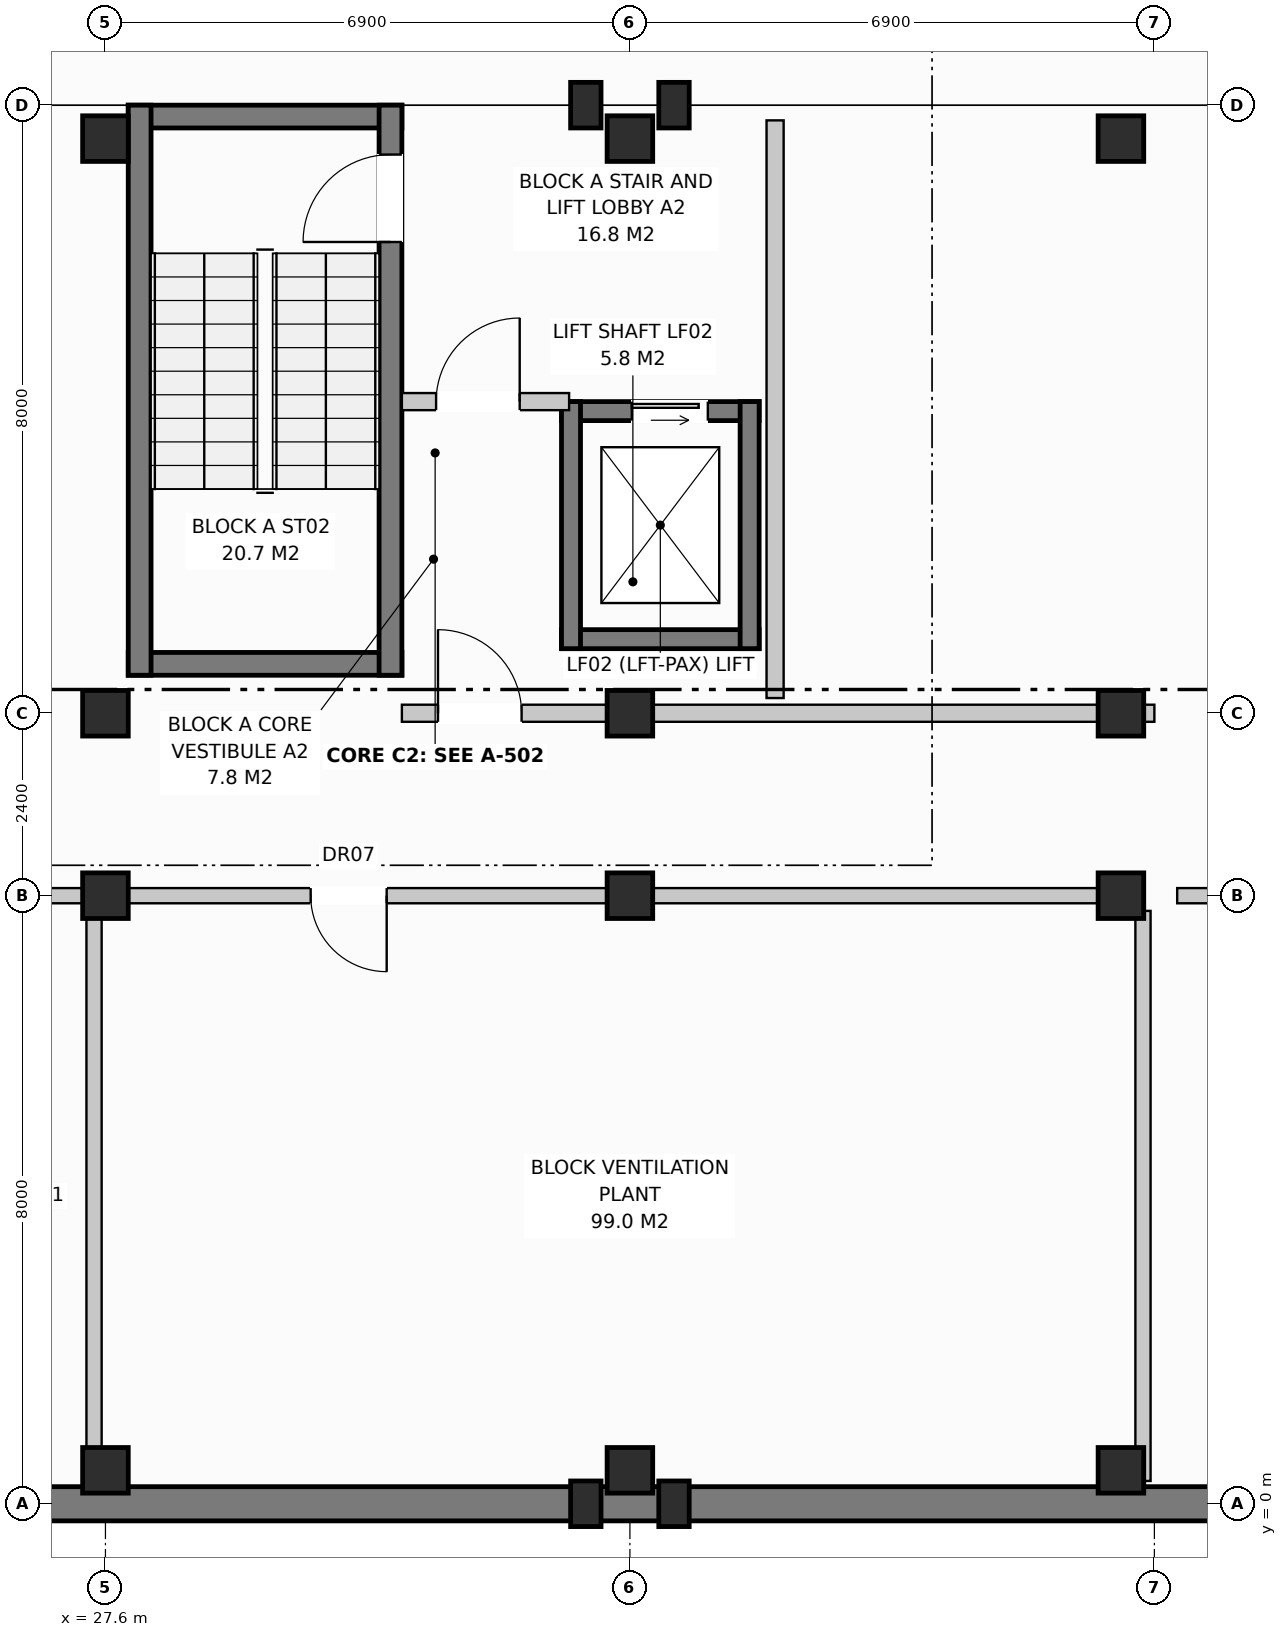
"""IFC4 building model, lengths in metres.
Left out: names, types, materials, properties, quantities, classifications, styles, units other than length and angle.
Written with IfcOpenShell. Run it as: python <this file> out.ifc"""

import sys

from ifc_helpers import new_model, si_unit, direction, frame, frame_2d, origin, origin_with_axes, origin_2d, place, context, subcontext, project, spatial, rectangle, extrude, element, fill, save


model = new_model("IFC4")
c1 = context("Model", 3, precision=1e-05, world=origin(), true_north=direction((0.0, 1.0)))
c2 = subcontext(c1, "Body", "Model", "MODEL_VIEW")
j1 = project(units=[si_unit("LENGTHUNIT", "METRE"), si_unit("PLANEANGLEUNIT", "RADIAN")], contexts=[c1])
p1 = place(None, origin())
s1 = spatial("IfcSite", under=j1, at=p1, CompositionType="ELEMENT")
p2 = place(p1, origin())
s2 = spatial("IfcBuilding", under=s1, at=p2, CompositionType="ELEMENT")
p3 = place(p2, frame((0.0, 0.0, -3.8)))
s3 = spatial("IfcBuildingStorey", under=s2, at=p3, CompositionType="ELEMENT", Elevation=-3.8)
for number, where, z_axis, x_axis in (
    (1, (27.6, 0.44, 0.0), (0.0, 0.0, 1.0), (1.0, 0.0, 0.0)),
    (2, (27.6, 8.0, 0.0), (0.0, 0.0, 1.0), (1.0, 0.0, 0.0)),
    (3, (27.6, 10.4, 0.0), (0.0, 0.0, 1.0), (1.0, 0.0, 0.0)),
    (4, (27.6, 17.96, 0.0), (0.0, 0.0, 1.0), (1.0, 0.0, 0.0)),
    (5, (34.5, 0.44, 0.0), (0.0, 0.0, 1.0), (1.0, 0.0, 0.0)),
    (6, (34.5, 8.0, 0.0), (0.0, 0.0, 1.0), (1.0, 0.0, 0.0)),
    (7, (34.5, 10.4, 0.0), (0.0, 0.0, 1.0), (1.0, 0.0, 0.0)),
    (8, (34.5, 17.96, 0.0), (0.0, 0.0, 1.0), (1.0, 0.0, 0.0)),
    (9, (40.96, 0.44, 0.0), (0.0, 0.0, 1.0), (1.0, 0.0, 0.0)),
    (10, (40.96, 8.0, 0.0), (0.0, 0.0, 1.0), (1.0, 0.0, 0.0)),
    (11, (40.96, 10.4, 0.0), (0.0, 0.0, 1.0), (1.0, 0.0, 0.0)),
    (12, (40.96, 17.96, 0.0), (0.0, 0.0, 1.0), (1.0, 0.0, 0.0)),
):
    element("IfcColumn", number, at=place(p3, frame(where, z_axis=z_axis, x_axis=x_axis)), inside=s3, PredefinedType="COLUMN", context=c2, shape_type="SweptSolid", body=[
        extrude(rectangle(XDim=0.6, YDim=0.6, at=origin_2d()), origin(), (0.0, 0.0, 1.0), 3.8),
    ])
for number, where, z_axis, x_axis in (
    (13, (33.92, 0.0, 0.0), (0.0, 0.0, 1.0), (1.0, 0.0, 0.0)),
    (14, (33.92, 18.4, 0.0), (0.0, 0.0, 1.0), (1.0, 0.0, 0.0)),
    (15, (35.08, 0.0, 0.0), (0.0, 0.0, 1.0), (1.0, 0.0, 0.0)),
    (16, (35.08, 18.4, 0.0), (0.0, 0.0, 1.0), (1.0, 0.0, 0.0)),
):
    element("IfcColumn", number, at=place(p3, frame(where, z_axis=z_axis, x_axis=x_axis)), inside=s3, PredefinedType="PILASTER", context=c2, shape_type="SweptSolid", body=[
        extrude(rectangle(XDim=0.4, YDim=0.6, at=origin_2d()), origin(), (0.0, 0.0, 1.0), 3.8),
    ])
p4 = place(p3, origin_with_axes())
e17 = element("IfcWall", 17, at=p4, inside=s3, PredefinedType="STANDARD", context=c2, shape_type="SweptSolid", body=[
    extrude(rectangle(XDim=168.0, YDim=0.45, at=frame_2d((84.0, 0.0))), origin(), (0.0, 0.0, 1.0), 3.48),
])
for number, where, z_axis, x_axis in (
    (18, (27.9, 18.25, 0.0), (0.0, 0.0, 1.0), (1.0, 0.0, 0.0)),
    (19, (27.9, 11.05, 0.0), (0.0, 0.0, 1.0), (1.0, 0.0, 0.0)),
):
    element("IfcWall", number, at=place(p3, frame(where, z_axis=z_axis, x_axis=x_axis)), inside=s3, PredefinedType="SHEAR", context=c2, shape_type="SweptSolid", body=[
        extrude(rectangle(XDim=3.6, YDim=0.3, at=frame_2d((1.8, 0.0))), origin(), (0.0, 0.0, 1.0), 3.48),
    ])
p5 = place(p3, frame((28.05, 10.9, 0.0), z_axis=(0.0, 0.0, 1.0), x_axis=(0.0, 1.0, 0.0)))
e20 = element("IfcWall", 20, at=p5, inside=s3, PredefinedType="SHEAR", context=c2, shape_type="SweptSolid", body=[
    extrude(rectangle(XDim=7.5, YDim=0.3, at=frame_2d((3.75, 0.0))), origin(), (0.0, 0.0, 1.0), 3.48),
])
p6 = place(p3, frame((31.35, 10.9, 0.0), z_axis=(0.0, 0.0, 1.0), x_axis=(0.0, 1.0, 0.0)))
e21 = element("IfcWall", 21, at=p6, inside=s3, PredefinedType="SHEAR", context=c2, shape_type="SweptSolid", body=[
    extrude(rectangle(XDim=7.5, YDim=0.3, at=frame_2d((3.75, 0.0))), origin(), (0.0, 0.0, 1.0), 3.48),
])
p7 = place(p6, frame((5.7, 0.0, 0.0)))
e22 = element("IfcOpeningElement", 22, at=p7, cuts=e21, PredefinedType="OPENING", context=c2, shape_type="SweptSolid", body=[
    extrude(rectangle(XDim=1.15, YDim=2.15, at=frame_2d((0.575, 1.075))), frame((0.0, 0.162, 0.0), z_axis=(0.0, -1.0, 0.0), x_axis=(1.0, 0.0, 0.0)), (0.0, 0.0, 1.0), 0.324),
])
p8 = place(p3, frame((33.6, 14.375, 0.0), z_axis=(0.0, 0.0, 1.0), x_axis=(1.0, 0.0, 0.0)))
e23 = element("IfcWall", 23, at=p8, inside=s3, PredefinedType="SHEAR", context=c2, shape_type="SweptSolid", body=[
    extrude(rectangle(XDim=2.6, YDim=0.25, at=frame_2d((1.3, 0.0))), origin(), (0.0, 0.0, 1.0), 3.48),
])
p9 = place(p8, frame((0.925, 0.0, 0.0)))
e24 = element("IfcOpeningElement", 24, at=p9, cuts=e23, PredefinedType="OPENING", context=c2, shape_type="SweptSolid", body=[
    extrude(rectangle(XDim=1.0, YDim=2.1, at=frame_2d((0.5, 1.05))), frame((0.0, 0.137, 0.0), z_axis=(0.0, -1.0, 0.0), x_axis=(1.0, 0.0, 0.0)), (0.0, 0.0, 1.0), 0.274),
])
p10 = place(p3, frame((33.6, 11.375, 0.0), z_axis=(0.0, 0.0, 1.0), x_axis=(1.0, 0.0, 0.0)))
e25 = element("IfcWall", 25, at=p10, inside=s3, PredefinedType="SHEAR", context=c2, shape_type="SweptSolid", body=[
    extrude(rectangle(XDim=2.6, YDim=0.25, at=frame_2d((1.3, 0.0))), origin(), (0.0, 0.0, 1.0), 3.48),
])
for number, where, z_axis, x_axis in (
    (26, (33.725, 11.25, 0.0), (0.0, 0.0, 1.0), (0.0, 1.0, 0.0)),
    (27, (36.075, 11.25, 0.0), (0.0, 0.0, 1.0), (0.0, 1.0, 0.0)),
):
    element("IfcWall", number, at=place(p3, frame(where, z_axis=z_axis, x_axis=x_axis)), inside=s3, PredefinedType="SHEAR", context=c2, shape_type="SweptSolid", body=[
        extrude(rectangle(XDim=3.25, YDim=0.25, at=frame_2d((1.625, 0.0))), origin(), (0.0, 0.0, 1.0), 3.48),
    ])
p11 = place(p3, frame((36.41, 10.6, 0.0), z_axis=(0.0, 0.0, 1.0), x_axis=(0.0, 1.0, 0.0)))
e28 = element("IfcWall", 28, at=p11, inside=s3, PredefinedType="PARTITIONING", context=c2, shape_type="SweptSolid", body=[
    extrude(rectangle(XDim=7.6, YDim=0.225, at=frame_2d((3.8, 0.0))), origin(), (0.0, 0.0, 1.0), 3.19),
])
p12 = place(p3, frame((31.5, 14.5, 0.0), z_axis=(0.0, 0.0, 1.0), x_axis=(1.0, 0.0, 0.0)))
e29 = element("IfcWall", 29, at=p12, inside=s3, PredefinedType="PARTITIONING", context=c2, shape_type="SweptSolid", body=[
    extrude(rectangle(XDim=2.2, YDim=0.225, at=frame_2d((1.1, 0.0))), origin(), (0.0, 0.0, 1.0), 3.48),
])
p13 = place(p12, frame((0.45, 0.0, 0.0)))
e30 = element("IfcOpeningElement", 30, at=p13, cuts=e29, PredefinedType="OPENING", context=c2, shape_type="SweptSolid", body=[
    extrude(rectangle(XDim=1.1, YDim=2.15, at=frame_2d((0.55, 1.075))), frame((0.0, 0.125, 0.0), z_axis=(0.0, -1.0, 0.0), x_axis=(1.0, 0.0, 0.0)), (0.0, 0.0, 1.0), 0.249),
])
p14 = place(p3, frame((27.6, 10.4, 0.0), z_axis=(0.0, 0.0, 1.0), x_axis=(1.0, 0.0, 0.0)))
e31 = element("IfcWall", 31, at=p14, inside=s3, PredefinedType="PARTITIONING", context=c2, shape_type="SweptSolid", body=[
    extrude(rectangle(XDim=0.3, YDim=0.225, at=frame_2d((0.15, 0.0))), origin(), (0.0, 0.0, 1.0), 3.48),
])
p15 = place(p3, frame((31.5, 10.4, 0.0), z_axis=(0.0, 0.0, 1.0), x_axis=(1.0, 0.0, 0.0)))
e32 = element("IfcWall", 32, at=p15, inside=s3, PredefinedType="PARTITIONING", context=c2, shape_type="SweptSolid", body=[
    extrude(rectangle(XDim=9.9, YDim=0.225, at=frame_2d((4.95, 0.0))), origin(), (0.0, 0.0, 1.0), 2.92),
])
p16 = place(p15, frame((0.475, 0.0, 0.0)))
e33 = element("IfcOpeningElement", 33, at=p16, cuts=e32, PredefinedType="OPENING", context=c2, shape_type="SweptSolid", body=[
    extrude(rectangle(XDim=1.1, YDim=2.15, at=frame_2d((0.55, 1.075))), frame((0.0, 0.125, 0.0), z_axis=(0.0, -1.0, 0.0), x_axis=(1.0, 0.0, 0.0)), (0.0, 0.0, 1.0), 0.249),
])
p17 = place(p3, frame((14.1, 8.0, 0.0), z_axis=(0.0, 0.0, 1.0), x_axis=(1.0, 0.0, 0.0)))
e34 = element("IfcWall", 34, at=p17, inside=s3, PredefinedType="PARTITIONING", context=c2, shape_type="SweptSolid", body=[
    extrude(rectangle(XDim=13.2, YDim=0.2, at=frame_2d((6.6, 0.0))), origin(), (0.0, 0.0, 1.0), 2.92),
])
p18 = place(p17, frame((2.4, 0.0, 0.0)))
e35 = element("IfcOpeningElement", 35, at=p18, cuts=e34, PredefinedType="OPENING", context=c2, shape_type="SweptSolid", body=[
    extrude(rectangle(XDim=1.0, YDim=2.15, at=frame_2d((0.5, 1.075))), frame((0.0, 0.112, 0.0), z_axis=(0.0, -1.0, 0.0), x_axis=(1.0, 0.0, 0.0)), (0.0, 0.0, 1.0), 0.224),
])
p19 = place(p3, frame((27.45, 0.3, 0.0), z_axis=(0.0, 0.0, 1.0), x_axis=(0.0, 1.0, 0.0)))
e36 = element("IfcWall", 36, at=p19, inside=s3, PredefinedType="PARTITIONING", context=c2, shape_type="SweptSolid", body=[
    extrude(rectangle(XDim=7.5, YDim=0.2, at=frame_2d((3.75, 0.0))), origin(), (0.0, 0.0, 1.0), 3.48),
])
p20 = place(p3, frame((27.9, 8.0, 0.0), z_axis=(0.0, 0.0, 1.0), x_axis=(1.0, 0.0, 0.0)))
e37 = element("IfcWall", 37, at=p20, inside=s3, PredefinedType="PARTITIONING", context=c2, shape_type="SweptSolid", body=[
    extrude(rectangle(XDim=13.2, YDim=0.2, at=frame_2d((6.6, 0.0))), origin(), (0.0, 0.0, 1.0), 2.92),
])
p21 = place(p20, frame((2.4, 0.0, 0.0)))
e38 = element("IfcOpeningElement", 38, at=p21, cuts=e37, PredefinedType="OPENING", context=c2, shape_type="SweptSolid", body=[
    extrude(rectangle(XDim=1.0, YDim=2.15, at=frame_2d((0.5, 1.075))), frame((0.0, 0.112, 0.0), z_axis=(0.0, -1.0, 0.0), x_axis=(1.0, 0.0, 0.0)), (0.0, 0.0, 1.0), 0.224),
])
p22 = place(p3, frame((41.25, 0.3, 0.0), z_axis=(0.0, 0.0, 1.0), x_axis=(0.0, 1.0, 0.0)))
e39 = element("IfcWall", 39, at=p22, inside=s3, PredefinedType="PARTITIONING", context=c2, shape_type="SweptSolid", body=[
    extrude(rectangle(XDim=7.5, YDim=0.2, at=frame_2d((3.75, 0.0))), origin(), (0.0, 0.0, 1.0), 3.48),
])
p23 = place(p3, frame((41.7, 8.0, 0.0), z_axis=(0.0, 0.0, 1.0), x_axis=(1.0, 0.0, 0.0)))
e40 = element("IfcWall", 40, at=p23, inside=s3, PredefinedType="PARTITIONING", context=c2, shape_type="SweptSolid", body=[
    extrude(rectangle(XDim=13.2, YDim=0.2, at=frame_2d((6.6, 0.0))), origin(), (0.0, 0.0, 1.0), 2.92),
])
p24 = place(p23, frame((2.4, 0.0, 0.0)))
e41 = element("IfcOpeningElement", 41, at=p24, cuts=e40, PredefinedType="OPENING", context=c2, shape_type="SweptSolid", body=[
    extrude(rectangle(XDim=1.0, YDim=2.15, at=frame_2d((0.5, 1.075))), frame((0.0, 0.112, 0.0), z_axis=(0.0, -1.0, 0.0), x_axis=(1.0, 0.0, 0.0)), (0.0, 0.0, 1.0), 0.224),
])
p25 = place(p7, origin_with_axes())
e42 = element("IfcDoor", 42, at=p25, inside=s3, OperationType="SINGLE_SWING_LEFT", PredefinedType="DOOR", context=c2, shape_type="SweptSolid", body=[
    extrude(rectangle(XDim=1.15, YDim=2.15, at=frame_2d((0.575, 1.075))), frame((0.0, 0.025, 0.0), z_axis=(0.0, -1.0, 0.0), x_axis=(1.0, 0.0, 0.0)), (0.0, 0.0, 1.0), 0.05),
])
fill(e22, e42)
p26 = place(p9, origin_with_axes())
e43 = element("IfcDoor", 43, at=p26, inside=s3, OperationType="SLIDING_TO_LEFT", PredefinedType="DOOR", context=c2, shape_type="SweptSolid", body=[
    extrude(rectangle(XDim=1.0, YDim=2.1, at=frame_2d((0.5, 1.05))), frame((0.0, 0.025, 0.0), z_axis=(0.0, -1.0, 0.0), x_axis=(1.0, 0.0, 0.0)), (0.0, 0.0, 1.0), 0.05),
])
fill(e24, e43)
p27 = place(p13, origin_with_axes())
e44 = element("IfcDoor", 44, at=p27, inside=s3, OperationType="SINGLE_SWING_RIGHT", PredefinedType="DOOR", context=c2, shape_type="SweptSolid", body=[
    extrude(rectangle(XDim=1.1, YDim=2.15, at=frame_2d((0.55, 1.075))), frame((0.0, 0.025, 0.0), z_axis=(0.0, -1.0, 0.0), x_axis=(1.0, 0.0, 0.0)), (0.0, 0.0, 1.0), 0.05),
])
fill(e30, e44)
p28 = place(p16, origin_with_axes())
e45 = element("IfcDoor", 45, at=p28, inside=s3, OperationType="SINGLE_SWING_LEFT", PredefinedType="DOOR", context=c2, shape_type="SweptSolid", body=[
    extrude(rectangle(XDim=1.1, YDim=2.15, at=frame_2d((0.55, 1.075))), frame((0.0, 0.025, 0.0), z_axis=(0.0, -1.0, 0.0), x_axis=(1.0, 0.0, 0.0)), (0.0, 0.0, 1.0), 0.05),
])
fill(e33, e45)
p29 = place(p21, frame((1.0, 0.0, 0.0), z_axis=(0.0, 0.0, 1.0), x_axis=(-1.0, 0.0, 0.0)))
e46 = element("IfcDoor", 46, at=p29, inside=s3, OperationType="SINGLE_SWING_RIGHT", PredefinedType="DOOR", context=c2, shape_type="SweptSolid", body=[
    extrude(rectangle(XDim=1.0, YDim=2.15, at=frame_2d((0.5, 1.075))), frame((0.0, 0.025, 0.0), z_axis=(0.0, -1.0, 0.0), x_axis=(1.0, 0.0, 0.0)), (0.0, 0.0, 1.0), 0.05),
])
fill(e38, e46)
save(model, sys.argv[1])
